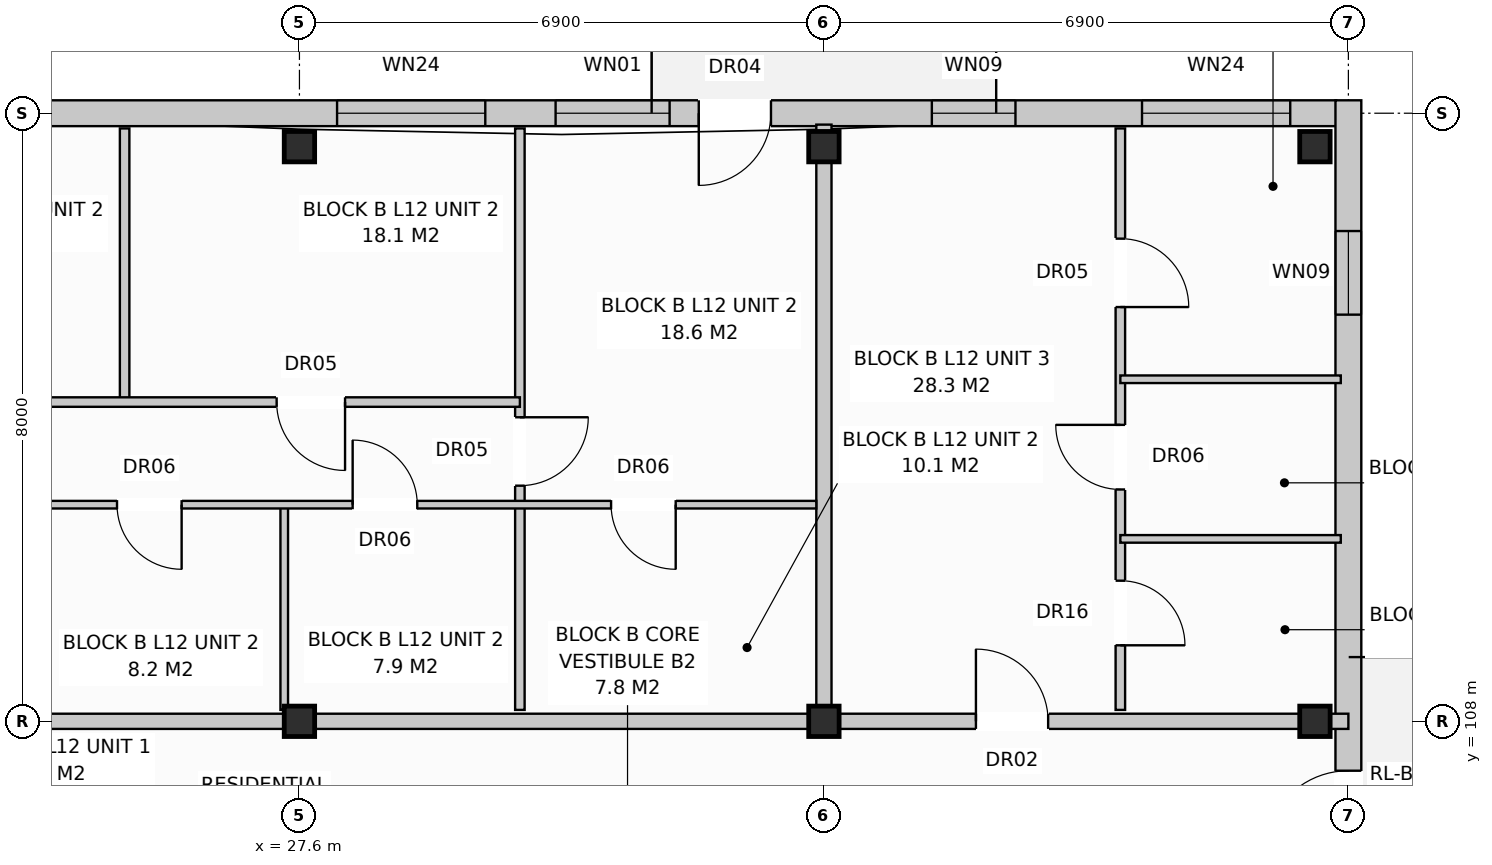
"""IFC4 building model, lengths in metres.
Left out: names, types, materials, properties, quantities, classifications, styles, units other than length and angle.
Written with IfcOpenShell. Run it as: python <this file> out.ifc"""

import sys

from ifc_helpers import new_model, si_unit, direction, frame, frame_2d, origin, origin_with_axes, origin_2d, place, context, subcontext, project, spatial, rectangle, extrude, element, fill, save


model = new_model("IFC4")
c1 = context("Model", 3, precision=1e-05, world=origin(), true_north=direction((0.0, 1.0)))
c2 = subcontext(c1, "Body", "Model", "MODEL_VIEW")
j1 = project(units=[si_unit("LENGTHUNIT", "METRE"), si_unit("PLANEANGLEUNIT", "RADIAN")], contexts=[c1])
p1 = place(None, origin())
s1 = spatial("IfcSite", under=j1, at=p1, CompositionType="ELEMENT")
p2 = place(p1, origin())
s2 = spatial("IfcBuilding", under=s1, at=p2, CompositionType="ELEMENT")
p3 = place(p2, frame((0.0, 0.0, 40.0)))
s3 = spatial("IfcBuildingStorey", under=s2, at=p3, CompositionType="ELEMENT", Elevation=40.0)
for number, where, z_axis, x_axis in (
    (1, (27.6, 108.0, 0.0), (0.0, 0.0, 1.0), (1.0, 0.0, 0.0)),
    (2, (27.6, 115.56, 0.0), (0.0, 0.0, 1.0), (1.0, 0.0, 0.0)),
    (3, (34.5, 108.0, 0.0), (0.0, 0.0, 1.0), (1.0, 0.0, 0.0)),
    (4, (34.5, 115.56, 0.0), (0.0, 0.0, 1.0), (1.0, 0.0, 0.0)),
    (5, (40.96, 108.0, 0.0), (0.0, 0.0, 1.0), (1.0, 0.0, 0.0)),
    (6, (40.96, 115.56, 0.0), (0.0, 0.0, 1.0), (1.0, 0.0, 0.0)),
):
    element("IfcColumn", number, at=place(p3, frame(where, z_axis=z_axis, x_axis=x_axis)), inside=s3, PredefinedType="COLUMN", context=c2, shape_type="SweptSolid", body=[
        extrude(rectangle(XDim=0.4, YDim=0.4, at=origin_2d()), origin(), (0.0, 0.0, 1.0), 3.2),
    ])
p4 = place(p3, frame((0.16, 116.0, 0.0), z_axis=(0.0, 0.0, 1.0), x_axis=(1.0, 0.0, 0.0)))
e7 = element("IfcWall", 7, at=p4, inside=s3, PredefinedType="STANDARD", context=c2, shape_type="SweptSolid", body=[
    extrude(rectangle(XDim=41.08, YDim=0.34, at=frame_2d((20.54, 0.0))), origin(), (0.0, 0.0, 1.0), 2.91),
])
p5 = place(p4, frame((7.41, 0.0, 0.0)))
e8 = element("IfcOpeningElement", 8, at=p5, cuts=e7, PredefinedType="OPENING", context=c2, shape_type="SweptSolid", body=[
    extrude(rectangle(XDim=0.95, YDim=2.1, at=frame_2d((0.475, 1.05))), frame((0.0, 0.182, 0.0), z_axis=(0.0, -1.0, 0.0), x_axis=(1.0, 0.0, 0.0)), (0.0, 0.0, 1.0), 0.364),
])
p6 = place(p4, frame((18.744, 0.0, 0.0)))
e9 = element("IfcOpeningElement", 9, at=p6, cuts=e7, PredefinedType="OPENING", context=c2, shape_type="SweptSolid", body=[
    extrude(rectangle(XDim=0.95, YDim=2.1, at=frame_2d((0.475, 1.05))), frame((0.0, 0.182, 0.0), z_axis=(0.0, -1.0, 0.0), x_axis=(1.0, 0.0, 0.0)), (0.0, 0.0, 1.0), 0.364),
])
p7 = place(p4, frame((32.694, 0.0, 0.0)))
e10 = element("IfcOpeningElement", 10, at=p7, cuts=e7, PredefinedType="OPENING", context=c2, shape_type="SweptSolid", body=[
    extrude(rectangle(XDim=0.95, YDim=2.1, at=frame_2d((0.475, 1.05))), frame((0.0, 0.182, 0.0), z_axis=(0.0, -1.0, 0.0), x_axis=(1.0, 0.0, 0.0)), (0.0, 0.0, 1.0), 0.364),
])
p8 = place(p4, frame((1.56, 0.0, 0.8)))
e11 = element("IfcOpeningElement", 11, at=p8, cuts=e7, PredefinedType="OPENING", context=c2, shape_type="SweptSolid", body=[
    extrude(rectangle(XDim=1.9, YDim=1.85, at=frame_2d((0.95, 0.925))), frame((0.0, 0.182, 0.0), z_axis=(0.0, -1.0, 0.0), x_axis=(1.0, 0.0, 0.0)), (0.0, 0.0, 1.0), 0.364),
])
p9 = place(p4, frame((10.435, 0.0, 0.8)))
e12 = element("IfcOpeningElement", 12, at=p9, cuts=e7, PredefinedType="OPENING", context=c2, shape_type="SweptSolid", body=[
    extrude(rectangle(XDim=1.95, YDim=1.65, at=frame_2d((0.975, 0.825))), frame((0.0, 0.182, 0.0), z_axis=(0.0, -1.0, 0.0), x_axis=(1.0, 0.0, 0.0)), (0.0, 0.0, 1.0), 0.364),
])
p10 = place(p4, frame((15.91, 0.0, 0.8)))
e13 = element("IfcOpeningElement", 13, at=p10, cuts=e7, PredefinedType="OPENING", context=c2, shape_type="SweptSolid", body=[
    extrude(rectangle(XDim=1.8, YDim=1.7, at=frame_2d((0.9, 0.85))), frame((0.0, 0.182, 0.0), z_axis=(0.0, -1.0, 0.0), x_axis=(1.0, 0.0, 0.0)), (0.0, 0.0, 1.0), 0.364),
])
p11 = place(p4, frame((21.96, 0.0, 0.72)))
e14 = element("IfcOpeningElement", 14, at=p11, cuts=e7, PredefinedType="OPENING", context=c2, shape_type="SweptSolid", body=[
    extrude(rectangle(XDim=1.1, YDim=1.5, at=frame_2d((0.55, 0.75))), frame((0.0, 0.182, 0.0), z_axis=(0.0, -1.0, 0.0), x_axis=(1.0, 0.0, 0.0)), (0.0, 0.0, 1.0), 0.364),
])
p12 = place(p4, frame((27.935, 0.0, 0.8)))
e15 = element("IfcOpeningElement", 15, at=p12, cuts=e7, PredefinedType="OPENING", context=c2, shape_type="SweptSolid", body=[
    extrude(rectangle(XDim=1.95, YDim=1.65, at=frame_2d((0.975, 0.825))), frame((0.0, 0.182, 0.0), z_axis=(0.0, -1.0, 0.0), x_axis=(1.0, 0.0, 0.0)), (0.0, 0.0, 1.0), 0.364),
])
p13 = place(p4, frame((30.81, 0.0, 0.85)))
e16 = element("IfcOpeningElement", 16, at=p13, cuts=e7, PredefinedType="OPENING", context=c2, shape_type="SweptSolid", body=[
    extrude(rectangle(XDim=1.5, YDim=1.65, at=frame_2d((0.75, 0.825))), frame((0.0, 0.182, 0.0), z_axis=(0.0, -1.0, 0.0), x_axis=(1.0, 0.0, 0.0)), (0.0, 0.0, 1.0), 0.364),
])
p14 = place(p4, frame((35.76, 0.0, 0.72)))
e17 = element("IfcOpeningElement", 17, at=p14, cuts=e7, PredefinedType="OPENING", context=c2, shape_type="SweptSolid", body=[
    extrude(rectangle(XDim=1.1, YDim=1.5, at=frame_2d((0.55, 0.75))), frame((0.0, 0.182, 0.0), z_axis=(0.0, -1.0, 0.0), x_axis=(1.0, 0.0, 0.0)), (0.0, 0.0, 1.0), 0.364),
])
p15 = place(p4, frame((38.525, 0.0, 0.8)))
e18 = element("IfcOpeningElement", 18, at=p15, cuts=e7, PredefinedType="OPENING", context=c2, shape_type="SweptSolid", body=[
    extrude(rectangle(XDim=1.95, YDim=1.65, at=frame_2d((0.975, 0.825))), frame((0.0, 0.182, 0.0), z_axis=(0.0, -1.0, 0.0), x_axis=(1.0, 0.0, 0.0)), (0.0, 0.0, 1.0), 0.364),
])
p16 = place(p3, frame((41.4, 97.43, 0.0), z_axis=(0.0, 0.0, 1.0), x_axis=(0.0, 1.0, 0.0)))
e19 = element("IfcWall", 19, at=p16, inside=s3, PredefinedType="STANDARD", context=c2, shape_type="SweptSolid", body=[
    extrude(rectangle(XDim=18.74, YDim=0.34, at=frame_2d((9.37, 0.0))), origin(), (0.0, 0.0, 1.0), 2.91),
])
p17 = place(p16, frame((8.82, 0.0, 0.0)))
e20 = element("IfcOpeningElement", 20, at=p17, cuts=e19, PredefinedType="OPENING", context=c2, shape_type="SweptSolid", body=[
    extrude(rectangle(XDim=1.1, YDim=2.1, at=frame_2d((0.55, 1.05))), frame((0.0, 0.182, 0.0), z_axis=(0.0, -1.0, 0.0), x_axis=(1.0, 0.0, 0.0)), (0.0, 0.0, 1.0), 0.364),
])
p18 = place(p16, frame((1.72, 0.0, 0.72)))
e21 = element("IfcOpeningElement", 21, at=p18, cuts=e19, PredefinedType="OPENING", context=c2, shape_type="SweptSolid", body=[
    extrude(rectangle(XDim=1.1, YDim=1.5, at=frame_2d((0.55, 0.75))), frame((0.0, 0.182, 0.0), z_axis=(0.0, -1.0, 0.0), x_axis=(1.0, 0.0, 0.0)), (0.0, 0.0, 1.0), 0.364),
])
p19 = place(p16, frame((15.92, 0.0, 0.72)))
e22 = element("IfcOpeningElement", 22, at=p19, cuts=e19, PredefinedType="OPENING", context=c2, shape_type="SweptSolid", body=[
    extrude(rectangle(XDim=1.1, YDim=1.5, at=frame_2d((0.55, 0.75))), frame((0.0, 0.182, 0.0), z_axis=(0.0, -1.0, 0.0), x_axis=(1.0, 0.0, 0.0)), (0.0, 0.0, 1.0), 0.364),
])
p20 = place(p3, frame((34.5, 108.15, 0.0), z_axis=(0.0, 0.0, 1.0), x_axis=(0.0, 1.0, 0.0)))
e23 = element("IfcWall", 23, at=p20, inside=s3, PredefinedType="PARTITIONING", context=c2, shape_type="SweptSolid", body=[
    extrude(rectangle(XDim=7.7, YDim=0.2, at=frame_2d((3.85, 0.0))), origin(), (0.0, 0.0, 1.0), 2.35),
])
p21 = place(p3, frame((13.8, 108.0, 0.0), z_axis=(0.0, 0.0, 1.0), x_axis=(1.0, 0.0, 0.0)))
e24 = element("IfcWall", 24, at=p21, inside=s3, PredefinedType="PARTITIONING", context=c2, shape_type="SweptSolid", body=[
    extrude(rectangle(XDim=20.7, YDim=0.2, at=frame_2d((10.35, 0.0))), origin(), (0.0, 0.0, 1.0), 2.35),
])
p22 = place(p21, frame((2.4, 0.0, 0.0)))
e25 = element("IfcOpeningElement", 25, at=p22, cuts=e24, PredefinedType="OPENING", context=c2, shape_type="SweptSolid", body=[
    extrude(rectangle(XDim=0.95, YDim=2.15, at=frame_2d((0.475, 1.075))), frame((0.0, 0.112, 0.0), z_axis=(0.0, -1.0, 0.0), x_axis=(1.0, 0.0, 0.0)), (0.0, 0.0, 1.0), 0.224),
])
p23 = place(p3, frame((27.4, 108.15, 0.0), z_axis=(0.0, 0.0, 1.0), x_axis=(0.0, 1.0, 0.0)))
e26 = element("IfcWall", 26, at=p23, inside=s3, PredefinedType="PARTITIONING", context=c2, shape_type="SweptSolid", body=[
    extrude(rectangle(XDim=2.7, YDim=0.1, at=frame_2d((1.35, 0.0))), origin(), (0.0, 0.0, 1.0), 2.97),
])
p24 = place(p3, frame((25.3, 112.2, 0.0), z_axis=(0.0, 0.0, 1.0), x_axis=(0.0, 1.0, 0.0)))
e27 = element("IfcWall", 27, at=p24, inside=s3, PredefinedType="PARTITIONING", context=c2, shape_type="SweptSolid", body=[
    extrude(rectangle(XDim=3.6, YDim=0.125, at=frame_2d((1.8, 0.0))), origin(), (0.0, 0.0, 1.0), 2.97),
])
p25 = place(p3, frame((30.5, 108.15, 0.0), z_axis=(0.0, 0.0, 1.0), x_axis=(0.0, 1.0, 0.0)))
e28 = element("IfcWall", 28, at=p25, inside=s3, PredefinedType="PARTITIONING", context=c2, shape_type="SweptSolid", body=[
    extrude(rectangle(XDim=7.65, YDim=0.125, at=frame_2d((3.825, 0.0))), origin(), (0.0, 0.0, 1.0), 2.97),
])
p26 = place(p25, frame((2.95, 0.0, 0.0)))
e29 = element("IfcOpeningElement", 29, at=p26, cuts=e28, PredefinedType="OPENING", context=c2, shape_type="SweptSolid", body=[
    extrude(rectangle(XDim=0.9, YDim=2.1, at=frame_2d((0.45, 1.05))), frame((0.0, 0.074, 0.0), z_axis=(0.0, -1.0, 0.0), x_axis=(1.0, 0.0, 0.0)), (0.0, 0.0, 1.0), 0.149),
])
p27 = place(p3, frame((20.1, 110.85, 0.0), z_axis=(0.0, 0.0, 1.0), x_axis=(1.0, 0.0, 0.0)))
e30 = element("IfcWall", 30, at=p27, inside=s3, PredefinedType="PARTITIONING", context=c2, shape_type="SweptSolid", body=[
    extrude(rectangle(XDim=14.3, YDim=0.1, at=frame_2d((7.15, 0.0))), origin(), (0.0, 0.0, 1.0), 2.97),
])
p28 = place(p27, frame((1.6, 0.0, 0.0)))
e31 = element("IfcOpeningElement", 31, at=p28, cuts=e30, PredefinedType="OPENING", context=c2, shape_type="SweptSolid", body=[
    extrude(rectangle(XDim=0.9, YDim=2.1, at=frame_2d((0.45, 1.05))), frame((0.0, 0.062, 0.0), z_axis=(0.0, -1.0, 0.0), x_axis=(1.0, 0.0, 0.0)), (0.0, 0.0, 1.0), 0.124),
])
p29 = place(p27, frame((5.1, 0.0, 0.0)))
e32 = element("IfcOpeningElement", 32, at=p29, cuts=e30, PredefinedType="OPENING", context=c2, shape_type="SweptSolid", body=[
    extrude(rectangle(XDim=0.85, YDim=2.05, at=frame_2d((0.425, 1.025))), frame((0.0, 0.062, 0.0), z_axis=(0.0, -1.0, 0.0), x_axis=(1.0, 0.0, 0.0)), (0.0, 0.0, 1.0), 0.124),
])
p30 = place(p27, frame((8.2, 0.0, 0.0)))
e33 = element("IfcOpeningElement", 33, at=p30, cuts=e30, PredefinedType="OPENING", context=c2, shape_type="SweptSolid", body=[
    extrude(rectangle(XDim=0.85, YDim=2.05, at=frame_2d((0.425, 1.025))), frame((0.0, 0.062, 0.0), z_axis=(0.0, -1.0, 0.0), x_axis=(1.0, 0.0, 0.0)), (0.0, 0.0, 1.0), 0.124),
])
p31 = place(p27, frame((11.6, 0.0, 0.0)))
e34 = element("IfcOpeningElement", 34, at=p31, cuts=e30, PredefinedType="OPENING", context=c2, shape_type="SweptSolid", body=[
    extrude(rectangle(XDim=0.85, YDim=2.05, at=frame_2d((0.425, 1.025))), frame((0.0, 0.062, 0.0), z_axis=(0.0, -1.0, 0.0), x_axis=(1.0, 0.0, 0.0)), (0.0, 0.0, 1.0), 0.124),
])
p32 = place(p3, frame((20.1, 112.2, 0.0), z_axis=(0.0, 0.0, 1.0), x_axis=(1.0, 0.0, 0.0)))
e35 = element("IfcWall", 35, at=p32, inside=s3, PredefinedType="PARTITIONING", context=c2, shape_type="SweptSolid", body=[
    extrude(rectangle(XDim=10.4, YDim=0.125, at=frame_2d((5.2, 0.0))), origin(), (0.0, 0.0, 1.0), 2.97),
])
p33 = place(p32, frame((2.0, 0.0, 0.0)))
e36 = element("IfcOpeningElement", 36, at=p33, cuts=e35, PredefinedType="OPENING", context=c2, shape_type="SweptSolid", body=[
    extrude(rectangle(XDim=0.9, YDim=2.1, at=frame_2d((0.45, 1.05))), frame((0.0, 0.074, 0.0), z_axis=(0.0, -1.0, 0.0), x_axis=(1.0, 0.0, 0.0)), (0.0, 0.0, 1.0), 0.149),
])
p34 = place(p32, frame((7.2, 0.0, 0.0)))
e37 = element("IfcOpeningElement", 37, at=p34, cuts=e35, PredefinedType="OPENING", context=c2, shape_type="SweptSolid", body=[
    extrude(rectangle(XDim=0.9, YDim=2.1, at=frame_2d((0.45, 1.05))), frame((0.0, 0.074, 0.0), z_axis=(0.0, -1.0, 0.0), x_axis=(1.0, 0.0, 0.0)), (0.0, 0.0, 1.0), 0.149),
])
p35 = place(p3, frame((34.5, 108.0, 0.0), z_axis=(0.0, 0.0, 1.0), x_axis=(1.0, 0.0, 0.0)))
e38 = element("IfcWall", 38, at=p35, inside=s3, PredefinedType="PARTITIONING", context=c2, shape_type="SweptSolid", body=[
    extrude(rectangle(XDim=6.9, YDim=0.2, at=frame_2d((3.45, 0.0))), origin(), (0.0, 0.0, 1.0), 2.35),
])
p36 = place(p35, frame((2.0, 0.0, 0.0)))
e39 = element("IfcOpeningElement", 39, at=p36, cuts=e38, PredefinedType="OPENING", context=c2, shape_type="SweptSolid", body=[
    extrude(rectangle(XDim=0.95, YDim=2.15, at=frame_2d((0.475, 1.075))), frame((0.0, 0.112, 0.0), z_axis=(0.0, -1.0, 0.0), x_axis=(1.0, 0.0, 0.0)), (0.0, 0.0, 1.0), 0.224),
])
p37 = place(p3, frame((38.4, 108.15, 0.0), z_axis=(0.0, 0.0, 1.0), x_axis=(0.0, 1.0, 0.0)))
e40 = element("IfcWall", 40, at=p37, inside=s3, PredefinedType="PARTITIONING", context=c2, shape_type="SweptSolid", body=[
    extrude(rectangle(XDim=7.65, YDim=0.125, at=frame_2d((3.825, 0.0))), origin(), (0.0, 0.0, 1.0), 2.97),
])
p38 = place(p37, frame((0.85, 0.0, 0.0)))
e41 = element("IfcOpeningElement", 41, at=p38, cuts=e40, PredefinedType="OPENING", context=c2, shape_type="SweptSolid", body=[
    extrude(rectangle(XDim=0.85, YDim=2.1, at=frame_2d((0.425, 1.05))), frame((0.0, 0.074, 0.0), z_axis=(0.0, -1.0, 0.0), x_axis=(1.0, 0.0, 0.0)), (0.0, 0.0, 1.0), 0.149),
])
p39 = place(p37, frame((2.9, 0.0, 0.0)))
e42 = element("IfcOpeningElement", 42, at=p39, cuts=e40, PredefinedType="OPENING", context=c2, shape_type="SweptSolid", body=[
    extrude(rectangle(XDim=0.85, YDim=2.05, at=frame_2d((0.425, 1.025))), frame((0.0, 0.074, 0.0), z_axis=(0.0, -1.0, 0.0), x_axis=(1.0, 0.0, 0.0)), (0.0, 0.0, 1.0), 0.149),
])
p40 = place(p37, frame((5.3, 0.0, 0.0)))
e43 = element("IfcOpeningElement", 43, at=p40, cuts=e40, PredefinedType="OPENING", context=c2, shape_type="SweptSolid", body=[
    extrude(rectangle(XDim=0.9, YDim=2.1, at=frame_2d((0.45, 1.05))), frame((0.0, 0.074, 0.0), z_axis=(0.0, -1.0, 0.0), x_axis=(1.0, 0.0, 0.0)), (0.0, 0.0, 1.0), 0.149),
])
for number, where, z_axis, x_axis in (
    (44, (38.4, 110.4, 0.0), (0.0, 0.0, 1.0), (1.0, 0.0, 0.0)),
    (45, (38.4, 112.5, 0.0), (0.0, 0.0, 1.0), (1.0, 0.0, 0.0)),
):
    element("IfcWall", number, at=place(p3, frame(where, z_axis=z_axis, x_axis=x_axis)), inside=s3, PredefinedType="PARTITIONING", context=c2, shape_type="SweptSolid", body=[
        extrude(rectangle(XDim=2.9, YDim=0.1, at=frame_2d((1.45, 0.0))), origin(), (0.0, 0.0, 1.0), 2.97),
    ])
p41 = place(p7, frame((0.95, 0.0, 0.0), z_axis=(0.0, 0.0, 1.0), x_axis=(-1.0, 0.0, 0.0)))
e46 = element("IfcDoor", 46, at=p41, inside=s3, OperationType="SINGLE_SWING_LEFT", PredefinedType="DOOR", context=c2, shape_type="SweptSolid", body=[
    extrude(rectangle(XDim=0.95, YDim=2.1, at=frame_2d((0.475, 1.05))), frame((0.0, 0.025, 0.0), z_axis=(0.0, -1.0, 0.0), x_axis=(1.0, 0.0, 0.0)), (0.0, 0.0, 1.0), 0.05),
])
fill(e10, e46)
p42 = place(p12, origin_with_axes())
e47 = element("IfcWindow", 47, at=p42, inside=s3, PartitioningType="SINGLE_PANEL", PredefinedType="WINDOW", context=c2, shape_type="SweptSolid", body=[
    extrude(rectangle(XDim=1.95, YDim=1.65, at=frame_2d((0.975, 0.825))), frame((0.0, 0.03, 0.0), z_axis=(0.0, -1.0, 0.0), x_axis=(1.0, 0.0, 0.0)), (0.0, 0.0, 1.0), 0.06),
])
fill(e15, e47)
p43 = place(p13, origin_with_axes())
e48 = element("IfcWindow", 48, at=p43, inside=s3, PartitioningType="SINGLE_PANEL", PredefinedType="WINDOW", context=c2, shape_type="SweptSolid", body=[
    extrude(rectangle(XDim=1.5, YDim=1.65, at=frame_2d((0.75, 0.825))), frame((0.0, 0.03, 0.0), z_axis=(0.0, -1.0, 0.0), x_axis=(1.0, 0.0, 0.0)), (0.0, 0.0, 1.0), 0.06),
])
fill(e16, e48)
p44 = place(p14, origin_with_axes())
e49 = element("IfcWindow", 49, at=p44, inside=s3, PartitioningType="SINGLE_PANEL", PredefinedType="WINDOW", context=c2, shape_type="SweptSolid", body=[
    extrude(rectangle(XDim=1.1, YDim=1.5, at=frame_2d((0.55, 0.75))), frame((0.0, 0.03, 0.0), z_axis=(0.0, -1.0, 0.0), x_axis=(1.0, 0.0, 0.0)), (0.0, 0.0, 1.0), 0.06),
])
fill(e17, e49)
p45 = place(p15, origin_with_axes())
e50 = element("IfcWindow", 50, at=p45, inside=s3, PartitioningType="SINGLE_PANEL", PredefinedType="WINDOW", context=c2, shape_type="SweptSolid", body=[
    extrude(rectangle(XDim=1.95, YDim=1.65, at=frame_2d((0.975, 0.825))), frame((0.0, 0.03, 0.0), z_axis=(0.0, -1.0, 0.0), x_axis=(1.0, 0.0, 0.0)), (0.0, 0.0, 1.0), 0.06),
])
fill(e18, e50)
p46 = place(p17, origin_with_axes())
e51 = element("IfcDoor", 51, at=p46, inside=s3, OperationType="SINGLE_SWING_LEFT", PredefinedType="DOOR", context=c2, shape_type="SweptSolid", body=[
    extrude(rectangle(XDim=1.1, YDim=2.1, at=frame_2d((0.55, 1.05))), frame((0.0, 0.025, 0.0), z_axis=(0.0, -1.0, 0.0), x_axis=(1.0, 0.0, 0.0)), (0.0, 0.0, 1.0), 0.05),
])
fill(e20, e51)
p47 = place(p19, origin_with_axes())
e52 = element("IfcWindow", 52, at=p47, inside=s3, PartitioningType="SINGLE_PANEL", PredefinedType="WINDOW", context=c2, shape_type="SweptSolid", body=[
    extrude(rectangle(XDim=1.1, YDim=1.5, at=frame_2d((0.55, 0.75))), frame((0.0, 0.03, 0.0), z_axis=(0.0, -1.0, 0.0), x_axis=(1.0, 0.0, 0.0)), (0.0, 0.0, 1.0), 0.06),
])
fill(e22, e52)
p48 = place(p26, frame((0.9, 0.0, 0.0), z_axis=(0.0, 0.0, 1.0), x_axis=(-1.0, 0.0, 0.0)))
e53 = element("IfcDoor", 53, at=p48, inside=s3, OperationType="SINGLE_SWING_RIGHT", PredefinedType="DOOR", context=c2, shape_type="SweptSolid", body=[
    extrude(rectangle(XDim=0.9, YDim=2.1, at=frame_2d((0.45, 1.05))), frame((0.0, 0.025, 0.0), z_axis=(0.0, -1.0, 0.0), x_axis=(1.0, 0.0, 0.0)), (0.0, 0.0, 1.0), 0.05),
])
fill(e29, e53)
p49 = place(p29, frame((0.85, 0.0, 0.0), z_axis=(0.0, 0.0, 1.0), x_axis=(-1.0, 0.0, 0.0)))
e54 = element("IfcDoor", 54, at=p49, inside=s3, OperationType="SINGLE_SWING_RIGHT", PredefinedType="DOOR", context=c2, shape_type="SweptSolid", body=[
    extrude(rectangle(XDim=0.85, YDim=2.05, at=frame_2d((0.425, 1.025))), frame((0.0, 0.025, 0.0), z_axis=(0.0, -1.0, 0.0), x_axis=(1.0, 0.0, 0.0)), (0.0, 0.0, 1.0), 0.05),
])
fill(e32, e54)
p50 = place(p30, origin_with_axes())
e55 = element("IfcDoor", 55, at=p50, inside=s3, OperationType="SINGLE_SWING_LEFT", PredefinedType="DOOR", context=c2, shape_type="SweptSolid", body=[
    extrude(rectangle(XDim=0.85, YDim=2.05, at=frame_2d((0.425, 1.025))), frame((0.0, 0.025, 0.0), z_axis=(0.0, -1.0, 0.0), x_axis=(1.0, 0.0, 0.0)), (0.0, 0.0, 1.0), 0.05),
])
fill(e33, e55)
p51 = place(p31, frame((0.85, 0.0, 0.0), z_axis=(0.0, 0.0, 1.0), x_axis=(-1.0, 0.0, 0.0)))
e56 = element("IfcDoor", 56, at=p51, inside=s3, OperationType="SINGLE_SWING_RIGHT", PredefinedType="DOOR", context=c2, shape_type="SweptSolid", body=[
    extrude(rectangle(XDim=0.85, YDim=2.05, at=frame_2d((0.425, 1.025))), frame((0.0, 0.025, 0.0), z_axis=(0.0, -1.0, 0.0), x_axis=(1.0, 0.0, 0.0)), (0.0, 0.0, 1.0), 0.05),
])
fill(e34, e56)
p52 = place(p34, frame((0.9, 0.0, 0.0), z_axis=(0.0, 0.0, 1.0), x_axis=(-1.0, 0.0, 0.0)))
e57 = element("IfcDoor", 57, at=p52, inside=s3, OperationType="SINGLE_SWING_RIGHT", PredefinedType="DOOR", context=c2, shape_type="SweptSolid", body=[
    extrude(rectangle(XDim=0.9, YDim=2.1, at=frame_2d((0.45, 1.05))), frame((0.0, 0.025, 0.0), z_axis=(0.0, -1.0, 0.0), x_axis=(1.0, 0.0, 0.0)), (0.0, 0.0, 1.0), 0.05),
])
fill(e37, e57)
p53 = place(p36, origin_with_axes())
e58 = element("IfcDoor", 58, at=p53, inside=s3, OperationType="SINGLE_SWING_LEFT", PredefinedType="DOOR", context=c2, shape_type="SweptSolid", body=[
    extrude(rectangle(XDim=0.95, YDim=2.15, at=frame_2d((0.475, 1.075))), frame((0.0, 0.025, 0.0), z_axis=(0.0, -1.0, 0.0), x_axis=(1.0, 0.0, 0.0)), (0.0, 0.0, 1.0), 0.05),
])
fill(e39, e58)
p54 = place(p38, frame((0.85, 0.0, 0.0), z_axis=(0.0, 0.0, 1.0), x_axis=(-1.0, 0.0, 0.0)))
e59 = element("IfcDoor", 59, at=p54, inside=s3, OperationType="SINGLE_SWING_LEFT", PredefinedType="DOOR", context=c2, shape_type="SweptSolid", body=[
    extrude(rectangle(XDim=0.85, YDim=2.1, at=frame_2d((0.425, 1.05))), frame((0.0, 0.025, 0.0), z_axis=(0.0, -1.0, 0.0), x_axis=(1.0, 0.0, 0.0)), (0.0, 0.0, 1.0), 0.05),
])
fill(e41, e59)
p55 = place(p39, origin_with_axes())
e60 = element("IfcDoor", 60, at=p55, inside=s3, OperationType="SINGLE_SWING_RIGHT", PredefinedType="DOOR", context=c2, shape_type="SweptSolid", body=[
    extrude(rectangle(XDim=0.85, YDim=2.05, at=frame_2d((0.425, 1.025))), frame((0.0, 0.025, 0.0), z_axis=(0.0, -1.0, 0.0), x_axis=(1.0, 0.0, 0.0)), (0.0, 0.0, 1.0), 0.05),
])
fill(e42, e60)
p56 = place(p40, frame((0.9, 0.0, 0.0), z_axis=(0.0, 0.0, 1.0), x_axis=(-1.0, 0.0, 0.0)))
e61 = element("IfcDoor", 61, at=p56, inside=s3, OperationType="SINGLE_SWING_LEFT", PredefinedType="DOOR", context=c2, shape_type="SweptSolid", body=[
    extrude(rectangle(XDim=0.9, YDim=2.1, at=frame_2d((0.45, 1.05))), frame((0.0, 0.025, 0.0), z_axis=(0.0, -1.0, 0.0), x_axis=(1.0, 0.0, 0.0)), (0.0, 0.0, 1.0), 0.05),
])
fill(e43, e61)
save(model, sys.argv[1])
